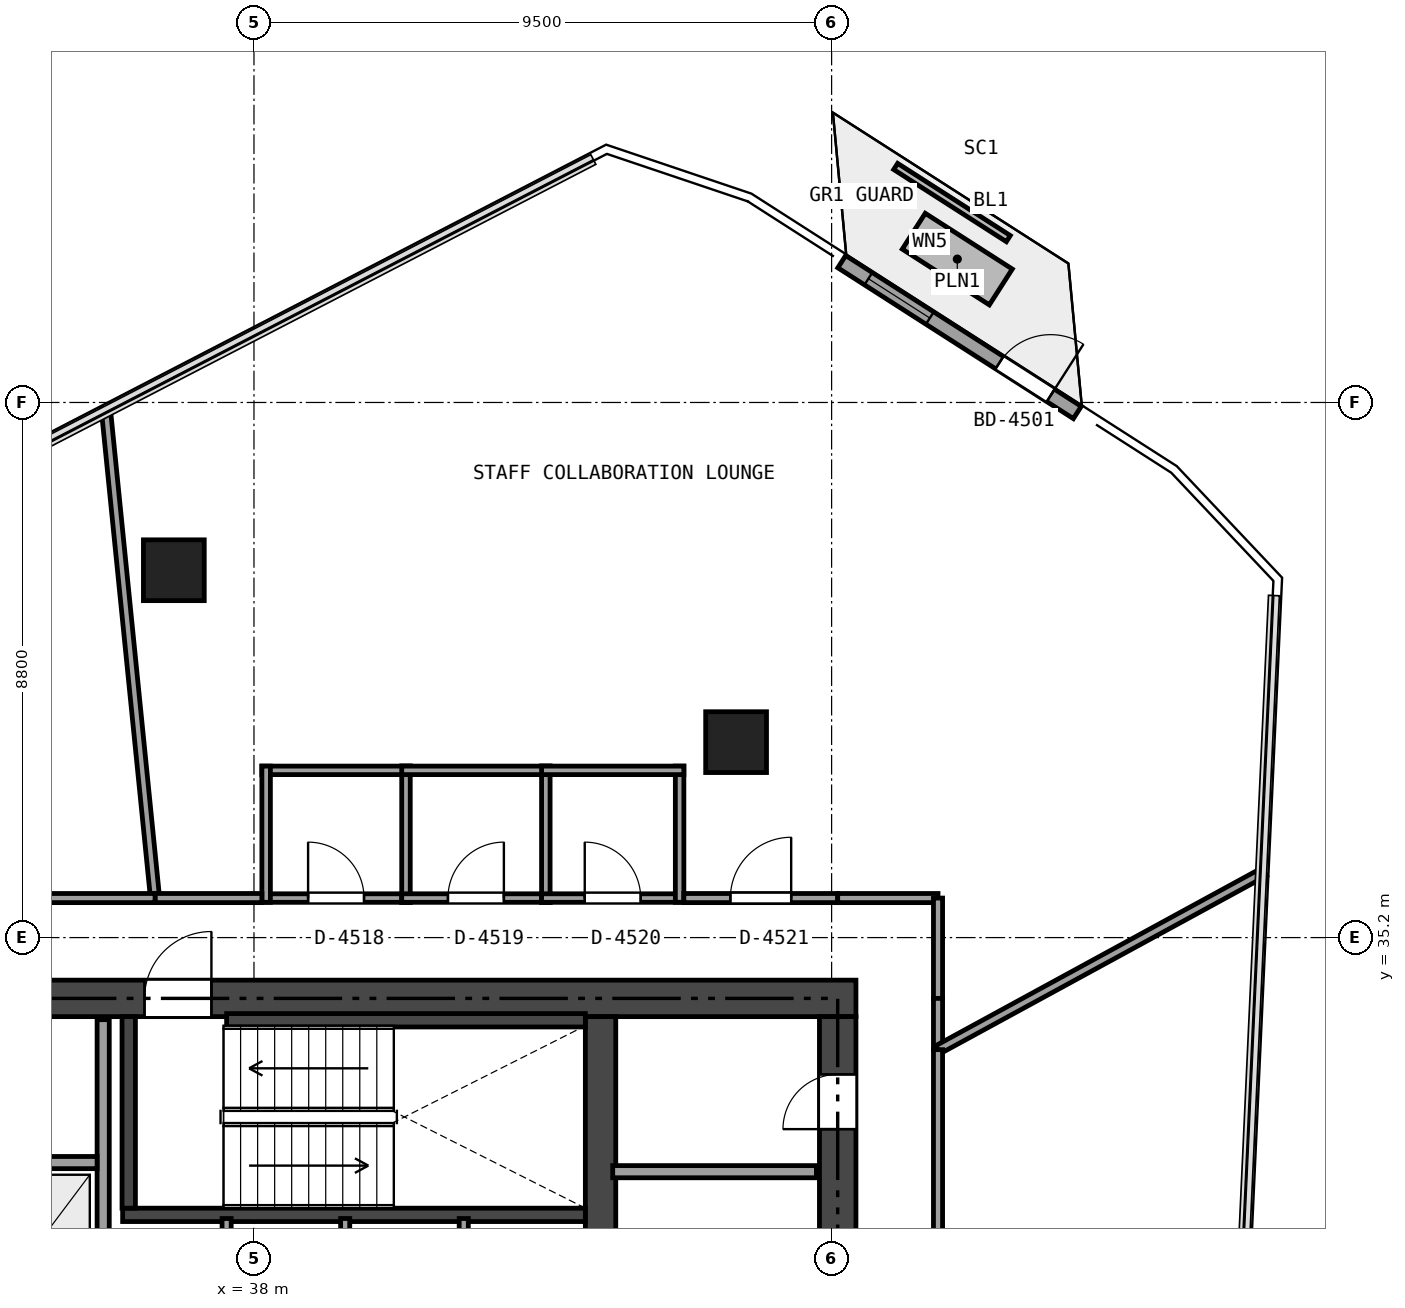
"""IFC4 building model, lengths in metres.
Left out: names, types, materials, properties, quantities, classifications, styles, units other than length and angle.
Written with IfcOpenShell. Run it as: python <this file> out.ifc"""

import sys

from ifc_helpers import new_model, si_unit, direction, frame, frame_2d, origin, origin_2d, place, context, subcontext, project, spatial, rectangle, extrude, element, fill, save


model = new_model("IFC4")
c1 = context("Model", 3, precision=1e-05, world=origin(), true_north=direction((0.0, 1.0)))
c2 = subcontext(c1, "Body", "Model", "MODEL_VIEW")
j1 = project(units=[si_unit("LENGTHUNIT", "METRE"), si_unit("PLANEANGLEUNIT", "RADIAN")], contexts=[c1])
p1 = place(None, origin())
s1 = spatial("IfcSite", under=j1, at=p1, CompositionType="ELEMENT")
p2 = place(p1, origin())
s2 = spatial("IfcBuilding", under=s1, at=p2, CompositionType="ELEMENT")
p3 = place(p2, frame((0.0, 0.0, 168.9)))
s3 = spatial("IfcBuildingStorey", under=s2, at=p3, CompositionType="ELEMENT", Elevation=168.9)
p4 = place(p3, frame((26.5, 34.2, 0.0), z_axis=(0.0, 0.0, 1.0), x_axis=(1.0, 0.0, 0.0)))
e1 = element("IfcWall", 1, at=p4, inside=s3, PredefinedType="SHEAR", context=c2, shape_type="SweptSolid", body=[
    extrude(rectangle(XDim=21.4, YDim=0.6, at=frame_2d((10.7, 0.0))), origin(), (0.0, 0.0, 1.0), 3.24),
])
p5 = place(p4, frame((9.7, 0.0, 0.0)))
e2 = element("IfcOpeningElement", 2, at=p5, cuts=e1, PredefinedType="OPENING", context=c2, shape_type="SweptSolid", body=[
    extrude(rectangle(XDim=1.1, YDim=2.15, at=frame_2d((0.55, 1.075))), frame((0.0, 0.31, 0.0), z_axis=(0.0, -1.0, 0.0), x_axis=(1.0, 0.0, 0.0)), (0.0, 0.0, 1.0), 0.62),
])
p6 = place(p4, frame((1.95, 0.0, 0.0)))
e3 = element("IfcOpeningElement", 3, at=p6, cuts=e1, PredefinedType="OPENING", context=c2, shape_type="SweptSolid", body=[
    extrude(rectangle(XDim=0.9, YDim=2.1, at=frame_2d((0.45, 1.05))), frame((0.0, 0.31, 0.0), z_axis=(0.0, -1.0, 0.0), x_axis=(1.0, 0.0, 0.0)), (0.0, 0.0, 1.0), 0.62),
])
p7 = place(p4, frame((6.25, 0.0, 0.0)))
e4 = element("IfcOpeningElement", 4, at=p7, cuts=e1, PredefinedType="OPENING", context=c2, shape_type="SweptSolid", body=[
    extrude(rectangle(XDim=0.9, YDim=2.1, at=frame_2d((0.45, 1.05))), frame((0.0, 0.31, 0.0), z_axis=(0.0, -1.0, 0.0), x_axis=(1.0, 0.0, 0.0)), (0.0, 0.0, 1.0), 0.62),
])
p8 = place(p3, frame((47.6, 18.9, 0.0), z_axis=(0.0, 0.0, 1.0), x_axis=(0.0, 1.0, 0.0)))
e5 = element("IfcWall", 5, at=p8, inside=s3, PredefinedType="SHEAR", context=c2, shape_type="SweptSolid", body=[
    extrude(rectangle(XDim=15.0, YDim=0.6, at=frame_2d((7.5, 0.0))), origin(), (0.0, 0.0, 1.0), 3.24),
])
p9 = place(p8, frame((6.6, 0.0, 0.0)))
e6 = element("IfcOpeningElement", 6, at=p9, cuts=e5, PredefinedType="OPENING", context=c2, shape_type="SweptSolid", body=[
    extrude(rectangle(XDim=1.1, YDim=2.15, at=frame_2d((0.55, 1.075))), frame((0.0, 0.31, 0.0), z_axis=(0.0, -1.0, 0.0), x_axis=(1.0, 0.0, 0.0)), (0.0, 0.0, 1.0), 0.62),
])
p10 = place(p8, frame((8.5, 0.0, 0.0)))
e7 = element("IfcOpeningElement", 7, at=p10, cuts=e5, PredefinedType="OPENING", context=c2, shape_type="SweptSolid", body=[
    extrude(rectangle(XDim=0.9, YDim=2.1, at=frame_2d((0.45, 1.05))), frame((0.0, 0.31, 0.0), z_axis=(0.0, -1.0, 0.0), x_axis=(1.0, 0.0, 0.0)), (0.0, 0.0, 1.0), 0.62),
])
p11 = place(p8, frame((13.15, 0.0, 0.0)))
e8 = element("IfcOpeningElement", 8, at=p11, cuts=e5, PredefinedType="OPENING", context=c2, shape_type="SweptSolid", body=[
    extrude(rectangle(XDim=0.9, YDim=2.1, at=frame_2d((0.45, 1.05))), frame((0.0, 0.31, 0.0), z_axis=(0.0, -1.0, 0.0), x_axis=(1.0, 0.0, 0.0)), (0.0, 0.0, 1.0), 0.62),
])
p12 = place(p3, frame((43.7, 18.9, 0.0), z_axis=(0.0, 0.0, 1.0), x_axis=(0.0, 1.0, 0.0)))
e9 = element("IfcWall", 9, at=p12, inside=s3, PredefinedType="SHEAR", context=c2, shape_type="SweptSolid", body=[
    extrude(rectangle(XDim=15.0, YDim=0.5, at=frame_2d((7.5, 0.0))), origin(), (0.0, 0.0, 1.0), 3.24),
])
p13 = place(p12, frame((8.1, 0.0, 0.0)))
e10 = element("IfcOpeningElement", 10, at=p13, cuts=e9, PredefinedType="OPENING", context=c2, shape_type="SweptSolid", body=[
    extrude(rectangle(XDim=0.9, YDim=2.1, at=frame_2d((0.45, 1.05))), frame((0.0, 0.26, 0.0), z_axis=(0.0, -1.0, 0.0), x_axis=(1.0, 0.0, 0.0)), (0.0, 0.0, 1.0), 0.52),
])
p14 = place(p3, frame((35.84, 30.64, 0.0), z_axis=(0.0, 0.0, 1.0), x_axis=(1.0, 0.0, 0.0)))
e11 = element("IfcWall", 11, at=p14, inside=s3, PredefinedType="SHEAR", context=c2, shape_type="SweptSolid", body=[
    extrude(rectangle(XDim=7.61, YDim=0.22, at=frame_2d((3.805, 0.0))), origin(), (0.0, 0.0, 1.0), 3.24),
])
p15 = place(p3, frame((35.94, 30.75, 0.0), z_axis=(0.0, 0.0, 1.0), x_axis=(0.0, 1.0, 0.0)))
e12 = element("IfcWall", 12, at=p15, inside=s3, PredefinedType="SHEAR", context=c2, shape_type="SweptSolid", body=[
    extrude(rectangle(XDim=3.15, YDim=0.22, at=frame_2d((1.575, 0.0))), origin(), (0.0, 0.0, 1.0), 3.24),
])
p16 = place(p3, frame((37.55, 33.84, 0.0), z_axis=(0.0, 0.0, 1.0), x_axis=(1.0, 0.0, 0.0)))
e13 = element("IfcWall", 13, at=p16, inside=s3, PredefinedType="SHEAR", context=c2, shape_type="SweptSolid", body=[
    extrude(rectangle(XDim=5.9, YDim=0.22, at=frame_2d((2.95, 0.0))), origin(), (0.0, 0.0, 1.0), 3.24),
])
for number, where, z_axis, x_axis in (
    (14, (45.929, 38.414, 0.0), (0.0, 0.0, 1.0), (1.0, 0.0, 0.0)),
    (15, (36.682, 41.241, 0.0), (0.0, 0.0, 1.0), (1.0, 0.0, 0.0)),
):
    element("IfcColumn", number, at=place(p3, frame(where, z_axis=z_axis, x_axis=x_axis)), inside=s3, PredefinedType="COLUMN", context=c2, shape_type="SweptSolid", body=[
        extrude(rectangle(XDim=1.0, YDim=1.0, at=origin_2d()), origin(), (0.0, 0.0, 1.0), 3.24),
    ])
p17 = place(p3, frame((47.667, 46.316, 0.0), z_axis=(0.0, 0.0, 1.0), x_axis=(0.842115227399, -0.539297639326, 0.0)))
e16 = element("IfcWall", 16, at=p17, inside=s3, PredefinedType="SOLIDWALL", context=c2, shape_type="SweptSolid", body=[
    extrude(rectangle(XDim=4.6, YDim=0.24, at=frame_2d((2.3, 0.0))), origin(), (0.0, 0.0, 1.0), 3.24),
])
p18 = place(p17, frame((3.08, 0.0, 0.0)))
e17 = element("IfcOpeningElement", 17, at=p18, cuts=e16, PredefinedType="OPENING", context=c2, shape_type="SweptSolid", body=[
    extrude(rectangle(XDim=1.0, YDim=2.15, at=frame_2d((0.5, 1.075))), frame((0.0, 0.13, 0.0), z_axis=(0.0, -1.0, 0.0), x_axis=(1.0, 0.0, 0.0)), (0.0, 0.0, 1.0), 0.26),
])
p19 = place(p17, frame((0.52, 0.0, 0.2)))
e18 = element("IfcOpeningElement", 18, at=p19, cuts=e16, PredefinedType="OPENING", context=c2, shape_type="SweptSolid", body=[
    extrude(rectangle(XDim=1.2, YDim=1.8, at=frame_2d((0.6, 0.9))), frame((0.0, 0.13, 0.0), z_axis=(0.0, -1.0, 0.0), x_axis=(1.0, 0.0, 0.0)), (0.0, 0.0, 1.0), 0.26),
])
p20 = place(p3, frame((43.9, 31.35, 0.0), z_axis=(0.0, 0.0, 1.0), x_axis=(1.0, 0.0, 0.0)))
e19 = element("IfcWall", 19, at=p20, inside=s3, PredefinedType="SOLIDWALL", context=c2, shape_type="SweptSolid", body=[
    extrude(rectangle(XDim=3.35, YDim=0.2, at=frame_2d((1.675, 0.0))), origin(), (0.0, 0.0, 1.0), 3.24),
])
p21 = place(p3, frame((35.52, 18.95, 0.0), z_axis=(0.0, 0.0, 1.0), x_axis=(0.0, 1.0, 0.0)))
e20 = element("IfcWall", 20, at=p21, inside=s3, PredefinedType="SOLIDWALL", context=c2, shape_type="SweptSolid", body=[
    extrude(rectangle(XDim=14.9, YDim=0.2, at=frame_2d((7.45, 0.0))), origin(), (0.0, 0.0, 1.0), 2.761),
])
p22 = place(p21, frame((7.755, 0.0, 0.0)))
e21 = element("IfcOpeningElement", 21, at=p22, cuts=e20, PredefinedType="OPENING", context=c2, shape_type="SweptSolid", body=[
    extrude(rectangle(XDim=0.95, YDim=2.15, at=frame_2d((0.475, 1.075))), frame((0.0, 0.11, 0.0), z_axis=(0.0, -1.0, 0.0), x_axis=(1.0, 0.0, 0.0)), (0.0, 0.0, 1.0), 0.22),
])
p23 = place(p21, frame((0.6, 0.0, 0.0)))
e22 = element("IfcOpeningElement", 22, at=p23, cuts=e20, PredefinedType="OPENING", context=c2, shape_type="SweptSolid", body=[
    extrude(rectangle(XDim=0.9, YDim=2.1, at=frame_2d((0.45, 1.05))), frame((0.0, 0.11, 0.0), z_axis=(0.0, -1.0, 0.0), x_axis=(1.0, 0.0, 0.0)), (0.0, 0.0, 1.0), 0.22),
])
p24 = place(p3, frame((31.0, 31.5, 0.0), z_axis=(0.0, 0.0, 1.0), x_axis=(1.0, 0.0, 0.0)))
e23 = element("IfcWall", 23, at=p24, inside=s3, PredefinedType="SOLIDWALL", context=c2, shape_type="SweptSolid", body=[
    extrude(rectangle(XDim=4.42, YDim=0.2, at=frame_2d((2.21, 0.0))), origin(), (0.0, 0.0, 1.0), 3.24),
])
for number, where, z_axis, x_axis in (
    (24, (37.55, 28.15, 0.0), (0.0, 0.0, 1.0), (0.0, 1.0, 0.0)),
    (25, (39.5, 28.15, 0.0), (0.0, 0.0, 1.0), (0.0, 1.0, 0.0)),
    (26, (41.45, 28.15, 0.0), (0.0, 0.0, 1.0), (0.0, 1.0, 0.0)),
):
    element("IfcWall", number, at=place(p3, frame(where, z_axis=z_axis, x_axis=x_axis)), inside=s3, PredefinedType="PARTITIONING", context=c2, shape_type="SweptSolid", body=[
        extrude(rectangle(XDim=2.43, YDim=0.15, at=frame_2d((1.215, 0.0))), origin(), (0.0, 0.0, 1.0), 3.24),
    ])
p25 = place(p3, frame((38.13, 35.85, 0.0), z_axis=(0.0, 0.0, 1.0), x_axis=(1.0, 0.0, 0.0)))
e27 = element("IfcWall", 27, at=p25, inside=s3, PredefinedType="PARTITIONING", context=c2, shape_type="SweptSolid", body=[
    extrude(rectangle(XDim=2.44, YDim=0.14, at=frame_2d((1.22, 0.0))), origin(), (0.0, 0.0, 1.0), 3.24),
])
p26 = place(p25, frame((0.76, 0.0, 0.0)))
e28 = element("IfcOpeningElement", 28, at=p26, cuts=e27, PredefinedType="OPENING", context=c2, shape_type="SweptSolid", body=[
    extrude(rectangle(XDim=0.92, YDim=2.1, at=frame_2d((0.46, 1.05))), frame((0.0, 0.08, 0.0), z_axis=(0.0, -1.0, 0.0), x_axis=(1.0, 0.0, 0.0)), (0.0, 0.0, 1.0), 0.16),
])
p27 = place(p3, frame((40.5, 35.78, 0.0), z_axis=(0.0, 0.0, 1.0), x_axis=(0.0, 1.0, 0.0)))
e29 = element("IfcWall", 29, at=p27, inside=s3, PredefinedType="PARTITIONING", context=c2, shape_type="SweptSolid", body=[
    extrude(rectangle(XDim=2.24, YDim=0.14, at=frame_2d((1.12, 0.0))), origin(), (0.0, 0.0, 1.0), 2.869),
])
p28 = place(p3, frame((40.57, 37.95, 0.0), z_axis=(0.0, 0.0, 1.0), x_axis=(-1.0, 0.0, 0.0)))
e30 = element("IfcWall", 30, at=p28, inside=s3, PredefinedType="PARTITIONING", context=c2, shape_type="SweptSolid", body=[
    extrude(rectangle(XDim=2.44, YDim=0.14, at=frame_2d((1.22, 0.0))), origin(), (0.0, 0.0, 1.0), 2.869),
])
p29 = place(p3, frame((38.2, 38.02, 0.0), z_axis=(0.0, 0.0, 1.0), x_axis=(0.0, -1.0, 0.0)))
e31 = element("IfcWall", 31, at=p29, inside=s3, PredefinedType="PARTITIONING", context=c2, shape_type="SweptSolid", body=[
    extrude(rectangle(XDim=2.24, YDim=0.14, at=frame_2d((1.12, 0.0))), origin(), (0.0, 0.0, 1.0), 2.869),
])
p30 = place(p3, frame((40.43, 35.85, 0.0), z_axis=(0.0, 0.0, 1.0), x_axis=(1.0, 0.0, 0.0)))
e32 = element("IfcWall", 32, at=p30, inside=s3, PredefinedType="PARTITIONING", context=c2, shape_type="SweptSolid", body=[
    extrude(rectangle(XDim=2.44, YDim=0.14, at=frame_2d((1.22, 0.0))), origin(), (0.0, 0.0, 1.0), 3.24),
])
p31 = place(p30, frame((0.76, 0.0, 0.0)))
e33 = element("IfcOpeningElement", 33, at=p31, cuts=e32, PredefinedType="OPENING", context=c2, shape_type="SweptSolid", body=[
    extrude(rectangle(XDim=0.92, YDim=2.1, at=frame_2d((0.46, 1.05))), frame((0.0, 0.08, 0.0), z_axis=(0.0, -1.0, 0.0), x_axis=(1.0, 0.0, 0.0)), (0.0, 0.0, 1.0), 0.16),
])
p32 = place(p3, frame((42.8, 35.78, 0.0), z_axis=(0.0, 0.0, 1.0), x_axis=(0.0, 1.0, 0.0)))
e34 = element("IfcWall", 34, at=p32, inside=s3, PredefinedType="PARTITIONING", context=c2, shape_type="SweptSolid", body=[
    extrude(rectangle(XDim=2.24, YDim=0.14, at=frame_2d((1.12, 0.0))), origin(), (0.0, 0.0, 1.0), 2.869),
])
p33 = place(p3, frame((42.87, 37.95, 0.0), z_axis=(0.0, 0.0, 1.0), x_axis=(-1.0, 0.0, 0.0)))
e35 = element("IfcWall", 35, at=p33, inside=s3, PredefinedType="PARTITIONING", context=c2, shape_type="SweptSolid", body=[
    extrude(rectangle(XDim=2.44, YDim=0.14, at=frame_2d((1.22, 0.0))), origin(), (0.0, 0.0, 1.0), 3.24),
])
p34 = place(p3, frame((42.73, 35.85, 0.0), z_axis=(0.0, 0.0, 1.0), x_axis=(1.0, 0.0, 0.0)))
e36 = element("IfcWall", 36, at=p34, inside=s3, PredefinedType="PARTITIONING", context=c2, shape_type="SweptSolid", body=[
    extrude(rectangle(XDim=2.34, YDim=0.14, at=frame_2d((1.17, 0.0))), origin(), (0.0, 0.0, 1.0), 2.607),
])
p35 = place(p34, frame((0.71, 0.0, 0.0)))
e37 = element("IfcOpeningElement", 37, at=p35, cuts=e36, PredefinedType="OPENING", context=c2, shape_type="SweptSolid", body=[
    extrude(rectangle(XDim=0.92, YDim=2.1, at=frame_2d((0.46, 1.05))), frame((0.0, 0.08, 0.0), z_axis=(0.0, -1.0, 0.0), x_axis=(1.0, 0.0, 0.0)), (0.0, 0.0, 1.0), 0.16),
])
p36 = place(p3, frame((45.0, 35.78, 0.0), z_axis=(0.0, 0.0, 1.0), x_axis=(0.0, 1.0, 0.0)))
e38 = element("IfcWall", 38, at=p36, inside=s3, PredefinedType="PARTITIONING", context=c2, shape_type="SweptSolid", body=[
    extrude(rectangle(XDim=2.24, YDim=0.14, at=frame_2d((1.12, 0.0))), origin(), (0.0, 0.0, 1.0), 2.607),
])
p37 = place(p3, frame((45.07, 37.95, 0.0), z_axis=(0.0, 0.0, 1.0), x_axis=(-1.0, 0.0, 0.0)))
e39 = element("IfcWall", 39, at=p37, inside=s3, PredefinedType="PARTITIONING", context=c2, shape_type="SweptSolid", body=[
    extrude(rectangle(XDim=2.34, YDim=0.14, at=frame_2d((1.17, 0.0))), origin(), (0.0, 0.0, 1.0), 3.24),
])
p38 = place(p3, frame((35.563, 43.898, 0.0), z_axis=(0.0, 0.0, 1.0), x_axis=(0.100149208892, -0.994972429748, 0.0)))
e40 = element("IfcWall", 40, at=p38, inside=s3, PredefinedType="PARTITIONING", context=c2, shape_type="SweptSolid", body=[
    extrude(rectangle(XDim=8.089, YDim=0.15, at=frame_2d((4.044, 0.0))), origin(), (0.0, 0.0, 1.0), 2.725),
])
p39 = place(p3, frame((36.373, 35.85, 0.0), z_axis=(0.0, 0.0, 1.0), x_axis=(1.0, 0.0, 0.0)))
e41 = element("IfcWall", 41, at=p39, inside=s3, PredefinedType="PARTITIONING", context=c2, shape_type="SweptSolid", body=[
    extrude(rectangle(XDim=1.757, YDim=0.15, at=frame_2d((0.878, 0.0))), origin(), (0.0, 0.0, 1.0), 2.607),
])
p40 = place(p3, frame((45.07, 35.85, 0.0), z_axis=(0.0, 0.0, 1.0), x_axis=(1.0, 0.0, 0.0)))
e42 = element("IfcWall", 42, at=p40, inside=s3, PredefinedType="PARTITIONING", context=c2, shape_type="SweptSolid", body=[
    extrude(rectangle(XDim=2.53, YDim=0.15, at=frame_2d((1.265, 0.0))), origin(), (0.0, 0.0, 1.0), 2.725),
])
p41 = place(p40, frame((0.765, 0.0, 0.0)))
e43 = element("IfcOpeningElement", 43, at=p41, cuts=e42, PredefinedType="OPENING", context=c2, shape_type="SweptSolid", body=[
    extrude(rectangle(XDim=1.0, YDim=2.15, at=frame_2d((0.5, 1.075))), frame((0.0, 0.085, 0.0), z_axis=(0.0, -1.0, 0.0), x_axis=(1.0, 0.0, 0.0)), (0.0, 0.0, 1.0), 0.17),
])
p42 = place(p3, frame((47.6, 35.85, 0.0), z_axis=(0.0, 0.0, 1.0), x_axis=(1.0, 0.0, 0.0)))
e44 = element("IfcWall", 44, at=p42, inside=s3, PredefinedType="PARTITIONING", context=c2, shape_type="SweptSolid", body=[
    extrude(rectangle(XDim=1.65, YDim=0.15, at=frame_2d((0.825, 0.0))), origin(), (0.0, 0.0, 1.0), 2.725),
])
p43 = place(p3, frame((49.25, 35.85, 0.0), z_axis=(0.0, 0.0, 1.0), x_axis=(0.0, -1.0, 0.0)))
e45 = element("IfcWall", 45, at=p43, inside=s3, PredefinedType="PARTITIONING", context=c2, shape_type="SweptSolid", body=[
    extrude(rectangle(XDim=1.65, YDim=0.15, at=frame_2d((0.825, 0.0))), origin(), (0.0, 0.0, 1.0), 3.24),
])
p44 = place(p3, frame((49.25, 34.2, 0.0), z_axis=(0.0, 0.0, 1.0), x_axis=(0.0, -1.0, 0.0)))
e46 = element("IfcWall", 46, at=p44, inside=s3, PredefinedType="PARTITIONING", context=c2, shape_type="SweptSolid", body=[
    extrude(rectangle(XDim=0.843, YDim=0.15, at=frame_2d((0.421, 0.0))), origin(), (0.0, 0.0, 1.0), 2.725),
])
p45 = place(p3, frame((49.25, 33.357, 0.0), z_axis=(0.0, 0.0, 1.0), x_axis=(0.878028313276, 0.478608693074, 0.0)))
e47 = element("IfcWall", 47, at=p45, inside=s3, PredefinedType="PARTITIONING", context=c2, shape_type="SweptSolid", body=[
    extrude(rectangle(XDim=6.114, YDim=0.15, at=frame_2d((3.057, 0.0))), origin(), (0.0, 0.0, 1.0), 2.725),
])
p46 = place(p3, frame((26.8, 35.85, 0.0), z_axis=(0.0, 0.0, 1.0), x_axis=(1.0, 0.0, 0.0)))
e48 = element("IfcWall", 48, at=p46, inside=s3, PredefinedType="PARTITIONING", context=c2, shape_type="SweptSolid", body=[
    extrude(rectangle(XDim=9.573, YDim=0.15, at=frame_2d((4.787, 0.0))), origin(), (0.0, 0.0, 1.0), 2.607),
])
p47 = place(p46, frame((4.286, 0.0, 0.0)))
e49 = element("IfcOpeningElement", 49, at=p47, cuts=e48, PredefinedType="OPENING", context=c2, shape_type="SweptSolid", body=[
    extrude(rectangle(XDim=1.0, YDim=2.15, at=frame_2d((0.5, 1.075))), frame((0.0, 0.085, 0.0), z_axis=(0.0, -1.0, 0.0), x_axis=(1.0, 0.0, 0.0)), (0.0, 0.0, 1.0), 0.17),
])
p48 = place(p3, frame((49.25, 33.357, 0.0), z_axis=(0.0, 0.0, 1.0), x_axis=(0.0, -1.0, 0.0)))
e50 = element("IfcWall", 50, at=p48, inside=s3, PredefinedType="PARTITIONING", context=c2, shape_type="SweptSolid", body=[
    extrude(rectangle(XDim=14.757, YDim=0.15, at=frame_2d((7.378, 0.0))), origin(), (0.0, 0.0, 1.0), 2.607),
])
p49 = place(p48, frame((6.928, 0.0, 0.0)))
e51 = element("IfcOpeningElement", 51, at=p49, cuts=e50, PredefinedType="OPENING", context=c2, shape_type="SweptSolid", body=[
    extrude(rectangle(XDim=0.9, YDim=2.0, at=frame_2d((0.45, 1.0))), frame((0.0, 0.085, 0.0), z_axis=(0.0, -1.0, 0.0), x_axis=(1.0, 0.0, 0.0)), (0.0, 0.0, 1.0), 0.17),
])
p50 = place(p18, origin())
e52 = element("IfcDoor", 52, at=p50, inside=s3, OperationType="SINGLE_SWING_RIGHT", PredefinedType="DOOR", context=c2, shape_type="SweptSolid", body=[
    extrude(rectangle(XDim=1.0, YDim=2.15, at=frame_2d((0.5, 1.075))), frame((0.0, 0.025, 0.0), z_axis=(0.0, -1.0, 0.0), x_axis=(1.0, 0.0, 0.0)), (0.0, 0.0, 1.0), 0.05),
])
fill(e17, e52)
p51 = place(p19, origin())
e53 = element("IfcWindow", 53, at=p51, inside=s3, PartitioningType="SINGLE_PANEL", PredefinedType="WINDOW", context=c2, shape_type="SweptSolid", body=[
    extrude(rectangle(XDim=1.2, YDim=1.8, at=frame_2d((0.6, 0.9))), frame((0.0, 0.03, 0.0), z_axis=(0.0, -1.0, 0.0), x_axis=(1.0, 0.0, 0.0)), (0.0, 0.0, 1.0), 0.06),
])
fill(e18, e53)
p52 = place(p5, origin())
e54 = element("IfcDoor", 54, at=p52, inside=s3, OperationType="SINGLE_SWING_RIGHT", PredefinedType="DOOR", context=c2, shape_type="SweptSolid", body=[
    extrude(rectangle(XDim=1.1, YDim=2.15, at=frame_2d((0.55, 1.075))), frame((0.0, 0.025, 0.0), z_axis=(0.0, -1.0, 0.0), x_axis=(1.0, 0.0, 0.0)), (0.0, 0.0, 1.0), 0.05),
])
fill(e2, e54)
p53 = place(p11, origin())
e55 = element("IfcDoor", 55, at=p53, inside=s3, OperationType="SINGLE_SWING_LEFT", PredefinedType="DOOR", context=c2, shape_type="SweptSolid", body=[
    extrude(rectangle(XDim=0.9, YDim=2.1, at=frame_2d((0.45, 1.05))), frame((0.0, 0.025, 0.0), z_axis=(0.0, -1.0, 0.0), x_axis=(1.0, 0.0, 0.0)), (0.0, 0.0, 1.0), 0.05),
])
fill(e8, e55)
p54 = place(p26, origin())
e56 = element("IfcDoor", 56, at=p54, inside=s3, OperationType="SINGLE_SWING_LEFT", PredefinedType="DOOR", context=c2, shape_type="SweptSolid", body=[
    extrude(rectangle(XDim=0.92, YDim=2.1, at=frame_2d((0.46, 1.05))), frame((0.0, 0.025, 0.0), z_axis=(0.0, -1.0, 0.0), x_axis=(1.0, 0.0, 0.0)), (0.0, 0.0, 1.0), 0.05),
])
fill(e28, e56)
p55 = place(p31, origin())
e57 = element("IfcDoor", 57, at=p55, inside=s3, OperationType="SINGLE_SWING_RIGHT", PredefinedType="DOOR", context=c2, shape_type="SweptSolid", body=[
    extrude(rectangle(XDim=0.92, YDim=2.1, at=frame_2d((0.46, 1.05))), frame((0.0, 0.025, 0.0), z_axis=(0.0, -1.0, 0.0), x_axis=(1.0, 0.0, 0.0)), (0.0, 0.0, 1.0), 0.05),
])
fill(e33, e57)
p56 = place(p35, origin())
e58 = element("IfcDoor", 58, at=p56, inside=s3, OperationType="SINGLE_SWING_LEFT", PredefinedType="DOOR", context=c2, shape_type="SweptSolid", body=[
    extrude(rectangle(XDim=0.92, YDim=2.1, at=frame_2d((0.46, 1.05))), frame((0.0, 0.025, 0.0), z_axis=(0.0, -1.0, 0.0), x_axis=(1.0, 0.0, 0.0)), (0.0, 0.0, 1.0), 0.05),
])
fill(e37, e58)
p57 = place(p41, origin())
e59 = element("IfcDoor", 59, at=p57, inside=s3, OperationType="SINGLE_SWING_RIGHT", PredefinedType="DOOR", context=c2, shape_type="SweptSolid", body=[
    extrude(rectangle(XDim=1.0, YDim=2.15, at=frame_2d((0.5, 1.075))), frame((0.0, 0.025, 0.0), z_axis=(0.0, -1.0, 0.0), x_axis=(1.0, 0.0, 0.0)), (0.0, 0.0, 1.0), 0.05),
])
fill(e43, e59)
save(model, sys.argv[1])
